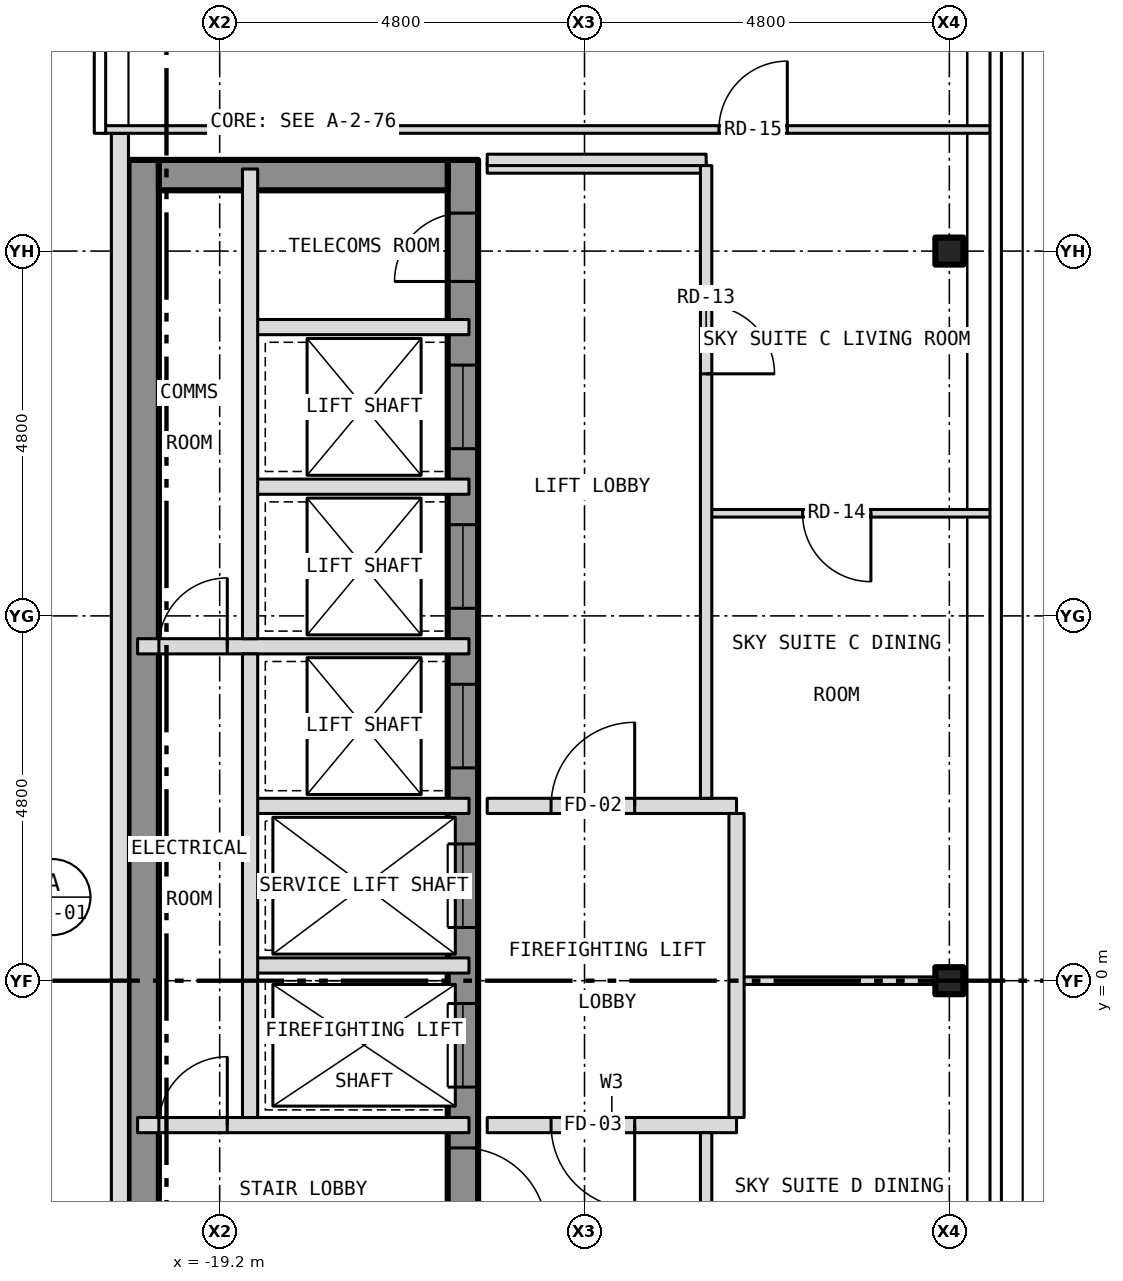
"""IFC4 building model, lengths in metres.
Left out: names, types, materials, properties, quantities, classifications, styles, units other than length and angle.
Written with IfcOpenShell. Run it as: python <this file> out.ifc"""

import sys

from ifc_helpers import new_model, si_unit, direction, frame, frame_2d, origin, origin_2d, place, context, subcontext, project, spatial, rectangle, i_section, extrude, element, fill, save


model = new_model("IFC4")
c1 = context("Model", 3, precision=1e-05, world=origin(), true_north=direction((0.0, 1.0)))
c2 = subcontext(c1, "Body", "Model", "MODEL_VIEW")
j1 = project(units=[si_unit("LENGTHUNIT", "METRE"), si_unit("PLANEANGLEUNIT", "RADIAN")], contexts=[c1])
p1 = place(None, origin())
s1 = spatial("IfcSite", under=j1, at=p1, CompositionType="ELEMENT")
p2 = place(p1, origin())
s2 = spatial("IfcBuilding", under=s1, at=p2, CompositionType="ELEMENT")
p3 = place(p2, frame((0.0, 0.0, 276.0)))
s3 = spatial("IfcBuildingStorey", under=s2, at=p3, CompositionType="ELEMENT", Elevation=276.0)
for number, where, z_axis, x_axis in (
    (1, (-9.6, 0.0, -0.15), (0.0, 0.0, 1.0), (1.0, 0.0, 0.0)),
    (2, (-9.6, 9.6, -0.15), (0.0, 0.0, 1.0), (1.0, 0.0, 0.0)),
):
    element("IfcColumn", number, at=place(p3, frame(where, z_axis=z_axis, x_axis=x_axis)), inside=s3, PredefinedType="COLUMN", context=c2, shape_type="SweptSolid", body=[
        extrude(i_section(OverallWidth=0.368, OverallDepth=0.356, WebThickness=0.011, FlangeThickness=0.018, at=origin_2d()), origin(), (0.0, 0.0, 1.0), 3.5),
    ])
p4 = place(p3, frame((-16.0, -10.8, 0.0), z_axis=(0.0, 0.0, 1.0), x_axis=(0.0, 1.0, 0.0)))
e3 = element("IfcWall", 3, at=p4, inside=s3, PredefinedType="SHEAR", context=c2, shape_type="SweptSolid", body=[
    extrude(rectangle(XDim=21.6, YDim=0.4, at=frame_2d((10.8, 0.0))), origin(), (0.0, 0.0, 1.0), 3.25),
])
p5 = place(p4, frame((9.4, 0.0, 0.0)))
e4 = element("IfcOpeningElement", 4, at=p5, cuts=e3, PredefinedType="OPENING", context=c2, shape_type="SweptSolid", body=[
    extrude(rectangle(XDim=1.1, YDim=2.1, at=frame_2d((0.55, 1.05))), frame((0.0, 0.212, 0.0), z_axis=(0.0, -1.0, 0.0), x_axis=(1.0, 0.0, 0.0)), (0.0, 0.0, 1.0), 0.424),
])
p6 = place(p4, frame((11.5, 0.0, 0.0)))
e5 = element("IfcOpeningElement", 5, at=p6, cuts=e3, PredefinedType="OPENING", context=c2, shape_type="SweptSolid", body=[
    extrude(rectangle(XDim=1.1, YDim=2.1, at=frame_2d((0.55, 1.05))), frame((0.0, 0.212, 0.0), z_axis=(0.0, -1.0, 0.0), x_axis=(1.0, 0.0, 0.0)), (0.0, 0.0, 1.0), 0.424),
])
p7 = place(p4, frame((13.6, 0.0, 0.0)))
e6 = element("IfcOpeningElement", 6, at=p7, cuts=e3, PredefinedType="OPENING", context=c2, shape_type="SweptSolid", body=[
    extrude(rectangle(XDim=1.1, YDim=2.1, at=frame_2d((0.55, 1.05))), frame((0.0, 0.212, 0.0), z_axis=(0.0, -1.0, 0.0), x_axis=(1.0, 0.0, 0.0)), (0.0, 0.0, 1.0), 0.424),
])
p8 = place(p4, frame((15.7, 0.0, 0.0)))
e7 = element("IfcOpeningElement", 7, at=p8, cuts=e3, PredefinedType="OPENING", context=c2, shape_type="SweptSolid", body=[
    extrude(rectangle(XDim=1.1, YDim=2.1, at=frame_2d((0.55, 1.05))), frame((0.0, 0.212, 0.0), z_axis=(0.0, -1.0, 0.0), x_axis=(1.0, 0.0, 0.0)), (0.0, 0.0, 1.0), 0.424),
])
p9 = place(p4, frame((17.8, 0.0, 0.0)))
e8 = element("IfcOpeningElement", 8, at=p9, cuts=e3, PredefinedType="OPENING", context=c2, shape_type="SweptSolid", body=[
    extrude(rectangle(XDim=1.1, YDim=2.1, at=frame_2d((0.55, 1.05))), frame((0.0, 0.212, 0.0), z_axis=(0.0, -1.0, 0.0), x_axis=(1.0, 0.0, 0.0)), (0.0, 0.0, 1.0), 0.424),
])
p10 = place(p4, frame((0.458, 0.0, 0.0)))
e9 = element("IfcOpeningElement", 9, at=p10, cuts=e3, PredefinedType="OPENING", context=c2, shape_type="SweptSolid", body=[
    extrude(rectangle(XDim=1.1, YDim=2.1, at=frame_2d((0.55, 1.05))), frame((0.0, 0.212, 0.0), z_axis=(0.0, -1.0, 0.0), x_axis=(1.0, 0.0, 0.0)), (0.0, 0.0, 1.0), 0.424),
])
p11 = place(p4, frame((7.5, 0.0, 0.0)))
e10 = element("IfcOpeningElement", 10, at=p11, cuts=e3, PredefinedType="OPENING", context=c2, shape_type="SweptSolid", body=[
    extrude(rectangle(XDim=1.1, YDim=2.1, at=frame_2d((0.55, 1.05))), frame((0.0, 0.212, 0.0), z_axis=(0.0, -1.0, 0.0), x_axis=(1.0, 0.0, 0.0)), (0.0, 0.0, 1.0), 0.424),
])
p12 = place(p4, frame((20.0, 0.0, 0.0)))
e11 = element("IfcOpeningElement", 11, at=p12, cuts=e3, PredefinedType="OPENING", context=c2, shape_type="SweptSolid", body=[
    extrude(rectangle(XDim=0.9, YDim=2.1, at=frame_2d((0.45, 1.05))), frame((0.0, 0.212, 0.0), z_axis=(0.0, -1.0, 0.0), x_axis=(1.0, 0.0, 0.0)), (0.0, 0.0, 1.0), 0.424),
])
p13 = place(p3, frame((-20.2, -10.8, 0.0), z_axis=(0.0, 0.0, 1.0), x_axis=(0.0, 1.0, 0.0)))
e12 = element("IfcWall", 12, at=p13, inside=s3, PredefinedType="SHEAR", context=c2, shape_type="SweptSolid", body=[
    extrude(rectangle(XDim=21.6, YDim=0.4, at=frame_2d((10.8, 0.0))), origin(), (0.0, 0.0, 1.0), 3.25),
])
p14 = place(p3, frame((-20.0, 10.6, 0.0), z_axis=(0.0, 0.0, 1.0), x_axis=(1.0, 0.0, 0.0)))
e13 = element("IfcWall", 13, at=p14, inside=s3, PredefinedType="SHEAR", context=c2, shape_type="SweptSolid", body=[
    extrude(rectangle(XDim=3.8, YDim=0.4, at=frame_2d((1.9, 0.0))), origin(), (0.0, 0.0, 1.0), 3.25),
])
p15 = place(p3, frame((-20.512, 11.15, 0.0), z_axis=(0.0, 0.0, 1.0), x_axis=(0.0, -1.0, 0.0)))
e14 = element("IfcWall", 14, at=p15, inside=s3, PredefinedType="SOLIDWALL", context=c2, shape_type="SweptSolid", body=[
    extrude(rectangle(XDim=22.3, YDim=0.225, at=frame_2d((11.15, 0.0))), origin(), (0.0, 0.0, 1.0), 3.5),
])
p16 = place(p15, frame((18.4, 0.0, 1.0)))
e15 = element("IfcOpeningElement", 15, at=p16, cuts=e14, PredefinedType="OPENING", context=c2, shape_type="SweptSolid", body=[
    extrude(rectangle(XDim=0.6, YDim=1.5, at=frame_2d((0.3, 0.75))), frame((0.0, 0.125, 0.0), z_axis=(0.0, -1.0, 0.0), x_axis=(1.0, 0.0, 0.0)), (0.0, 0.0, 1.0), 0.249),
])
p17 = place(p3, frame((-20.28, -1.9, 0.0), z_axis=(0.0, 0.0, 1.0), x_axis=(1.0, 0.0, 0.0)))
e16 = element("IfcWall", 16, at=p17, inside=s3, PredefinedType="PARTITIONING", context=c2, shape_type="SweptSolid", body=[
    extrude(rectangle(XDim=4.36, YDim=0.2, at=frame_2d((2.18, 0.0))), origin(), (0.0, 0.0, 1.0), 3.25),
])
p18 = place(p17, frame((0.28, 0.0, 0.0)))
e17 = element("IfcOpeningElement", 17, at=p18, cuts=e16, PredefinedType="OPENING", context=c2, shape_type="SweptSolid", body=[
    extrude(rectangle(XDim=0.9, YDim=2.1, at=frame_2d((0.45, 1.05))), frame((0.0, 0.112, 0.0), z_axis=(0.0, -1.0, 0.0), x_axis=(1.0, 0.0, 0.0)), (0.0, 0.0, 1.0), 0.224),
])
p19 = place(p3, frame((-15.68, -1.9, 0.0), z_axis=(0.0, 0.0, 1.0), x_axis=(1.0, 0.0, 0.0)))
e18 = element("IfcWall", 18, at=p19, inside=s3, PredefinedType="PARTITIONING", context=c2, shape_type="SweptSolid", body=[
    extrude(rectangle(XDim=3.28, YDim=0.2, at=frame_2d((1.64, 0.0))), origin(), (0.0, 0.0, 1.0), 3.35),
])
p20 = place(p19, frame((0.84, 0.0, 0.0)))
e19 = element("IfcOpeningElement", 19, at=p20, cuts=e18, PredefinedType="OPENING", context=c2, shape_type="SweptSolid", body=[
    extrude(rectangle(XDim=1.1, YDim=2.1, at=frame_2d((0.55, 1.05))), frame((0.0, 0.112, 0.0), z_axis=(0.0, -1.0, 0.0), x_axis=(1.0, 0.0, 0.0)), (0.0, 0.0, 1.0), 0.224),
])
p21 = place(p3, frame((-12.4, 0.0, 0.0), z_axis=(0.0, 0.0, 1.0), x_axis=(1.0, 0.0, 0.0)))
e20 = element("IfcWall", 20, at=p21, inside=s3, PredefinedType="PARTITIONING", context=c2, shape_type="SweptSolid", body=[
    extrude(rectangle(XDim=2.915, YDim=0.1, at=frame_2d((1.458, 0.0))), origin(), (0.0, 0.0, 1.0), 2.728),
])
for number, where, z_axis, x_axis in (
    (21, (-18.8, 0.2, 0.0), (0.0, 0.0, 1.0), (1.0, 0.0, 0.0)),
    (22, (-18.8, 2.3, 0.0), (0.0, 0.0, 1.0), (1.0, 0.0, 0.0)),
):
    element("IfcWall", number, at=place(p3, frame(where, z_axis=z_axis, x_axis=x_axis)), inside=s3, PredefinedType="PARTITIONING", context=c2, shape_type="SweptSolid", body=[
        extrude(rectangle(XDim=2.88, YDim=0.2, at=frame_2d((1.44, 0.0))), origin(), (0.0, 0.0, 1.0), 3.25),
    ])
p22 = place(p3, frame((-15.68, 2.3, 0.0), z_axis=(0.0, 0.0, 1.0), x_axis=(1.0, 0.0, 0.0)))
e23 = element("IfcWall", 23, at=p22, inside=s3, PredefinedType="PARTITIONING", context=c2, shape_type="SweptSolid", body=[
    extrude(rectangle(XDim=3.28, YDim=0.2, at=frame_2d((1.64, 0.0))), origin(), (0.0, 0.0, 1.0), 3.35),
])
p23 = place(p22, frame((0.84, 0.0, 0.0)))
e24 = element("IfcOpeningElement", 24, at=p23, cuts=e23, PredefinedType="OPENING", context=c2, shape_type="SweptSolid", body=[
    extrude(rectangle(XDim=1.1, YDim=2.1, at=frame_2d((0.55, 1.05))), frame((0.0, 0.112, 0.0), z_axis=(0.0, -1.0, 0.0), x_axis=(1.0, 0.0, 0.0)), (0.0, 0.0, 1.0), 0.224),
])
p24 = place(p3, frame((-20.28, 4.4, 0.0), z_axis=(0.0, 0.0, 1.0), x_axis=(1.0, 0.0, 0.0)))
e25 = element("IfcWall", 25, at=p24, inside=s3, PredefinedType="PARTITIONING", context=c2, shape_type="SweptSolid", body=[
    extrude(rectangle(XDim=4.36, YDim=0.2, at=frame_2d((2.18, 0.0))), origin(), (0.0, 0.0, 1.0), 3.25),
])
p25 = place(p24, frame((0.28, 0.0, 0.0)))
e26 = element("IfcOpeningElement", 26, at=p25, cuts=e25, PredefinedType="OPENING", context=c2, shape_type="SweptSolid", body=[
    extrude(rectangle(XDim=0.9, YDim=2.1, at=frame_2d((0.45, 1.05))), frame((0.0, 0.112, 0.0), z_axis=(0.0, -1.0, 0.0), x_axis=(1.0, 0.0, 0.0)), (0.0, 0.0, 1.0), 0.224),
])
p26 = place(p3, frame((-12.8, 6.15, 0.0), z_axis=(0.0, 0.0, 1.0), x_axis=(1.0, 0.0, 0.0)))
e27 = element("IfcWall", 27, at=p26, inside=s3, PredefinedType="PARTITIONING", context=c2, shape_type="SweptSolid", body=[
    extrude(rectangle(XDim=3.765, YDim=0.1, at=frame_2d((1.883, 0.0))), origin(), (0.0, 0.0, 1.0), 3.35),
])
p27 = place(p26, frame((1.268, 0.0, 0.0)))
e28 = element("IfcOpeningElement", 28, at=p27, cuts=e27, PredefinedType="OPENING", context=c2, shape_type="SweptSolid", body=[
    extrude(rectangle(XDim=0.9, YDim=2.1, at=frame_2d((0.45, 1.05))), frame((0.0, 0.062, 0.0), z_axis=(0.0, -1.0, 0.0), x_axis=(1.0, 0.0, 0.0)), (0.0, 0.0, 1.0), 0.124),
])
for number, where, z_axis, x_axis in (
    (29, (-18.8, 6.5, 0.0), (0.0, 0.0, 1.0), (1.0, 0.0, 0.0)),
    (30, (-18.8, 8.6, 0.0), (0.0, 0.0, 1.0), (1.0, 0.0, 0.0)),
):
    element("IfcWall", number, at=place(p3, frame(where, z_axis=z_axis, x_axis=x_axis)), inside=s3, PredefinedType="PARTITIONING", context=c2, shape_type="SweptSolid", body=[
        extrude(rectangle(XDim=2.88, YDim=0.2, at=frame_2d((1.44, 0.0))), origin(), (0.0, 0.0, 1.0), 3.25),
    ])
for number, where, z_axis, x_axis in (
    (31, (-15.68, 10.7, 0.0), (0.0, 0.0, 1.0), (1.0, 0.0, 0.0)),
    (32, (-15.68, 10.8, 0.0), (0.0, 0.0, 1.0), (1.0, 0.0, 0.0)),
):
    element("IfcWall", number, at=place(p3, frame(where, z_axis=z_axis, x_axis=x_axis)), inside=s3, PredefinedType="PARTITIONING", context=c2, shape_type="SweptSolid", body=[
        extrude(rectangle(XDim=2.88, YDim=0.15, at=frame_2d((1.44, 0.0))), origin(), (0.0, 0.0, 1.0), 3.35),
    ])
p28 = place(p3, frame((-20.73, 11.2, 0.0), z_axis=(0.0, 0.0, 1.0), x_axis=(1.0, 0.0, 0.0)))
e33 = element("IfcWall", 33, at=p28, inside=s3, PredefinedType="PARTITIONING", context=c2, shape_type="SweptSolid", body=[
    extrude(rectangle(XDim=11.695, YDim=0.1, at=frame_2d((5.848, 0.0))), origin(), (0.0, 0.0, 1.0), 3.35),
])
p29 = place(p28, frame((8.098, 0.0, 0.0)))
e34 = element("IfcOpeningElement", 34, at=p29, cuts=e33, PredefinedType="OPENING", context=c2, shape_type="SweptSolid", body=[
    extrude(rectangle(XDim=0.9, YDim=2.1, at=frame_2d((0.45, 1.05))), frame((0.0, 0.062, 0.0), z_axis=(0.0, -1.0, 0.0), x_axis=(1.0, 0.0, 0.0)), (0.0, 0.0, 1.0), 0.124),
])
p30 = place(p3, frame((-18.8, -1.8, 0.0), z_axis=(0.0, 0.0, 1.0), x_axis=(0.0, 1.0, 0.0)))
e35 = element("IfcWall", 35, at=p30, inside=s3, PredefinedType="PARTITIONING", context=c2, shape_type="SweptSolid", body=[
    extrude(rectangle(XDim=6.1, YDim=0.2, at=frame_2d((3.05, 0.0))), origin(), (0.0, 0.0, 1.0), 3.25),
])
p31 = place(p3, frame((-18.8, 4.5, 0.0), z_axis=(0.0, 0.0, 1.0), x_axis=(0.0, 1.0, 0.0)))
e36 = element("IfcWall", 36, at=p31, inside=s3, PredefinedType="PARTITIONING", context=c2, shape_type="SweptSolid", body=[
    extrude(rectangle(XDim=6.18, YDim=0.2, at=frame_2d((3.09, 0.0))), origin(), (0.0, 0.0, 1.0), 3.25),
])
p32 = place(p3, frame((-12.8, -10.725, 0.0), z_axis=(0.0, 0.0, 1.0), x_axis=(0.0, 1.0, 0.0)))
e37 = element("IfcWall", 37, at=p32, inside=s3, PredefinedType="PARTITIONING", context=c2, shape_type="SweptSolid", body=[
    extrude(rectangle(XDim=8.725, YDim=0.15, at=frame_2d((4.363, 0.0))), origin(), (0.0, 0.0, 1.0), 3.35),
])
p33 = place(p32, frame((2.88, 0.0, 0.0)))
e38 = element("IfcOpeningElement", 38, at=p33, cuts=e37, PredefinedType="OPENING", context=c2, shape_type="SweptSolid", body=[
    extrude(rectangle(XDim=0.9, YDim=2.1, at=frame_2d((0.45, 1.05))), frame((0.0, 0.087, 0.0), z_axis=(0.0, -1.0, 0.0), x_axis=(1.0, 0.0, 0.0)), (0.0, 0.0, 1.0), 0.174),
])
p34 = place(p3, frame((-12.8, 2.4, 0.0), z_axis=(0.0, 0.0, 1.0), x_axis=(0.0, 1.0, 0.0)))
e39 = element("IfcWall", 39, at=p34, inside=s3, PredefinedType="PARTITIONING", context=c2, shape_type="SweptSolid", body=[
    extrude(rectangle(XDim=8.325, YDim=0.15, at=frame_2d((4.163, 0.0))), origin(), (0.0, 0.0, 1.0), 3.35),
])
p35 = place(p34, frame((5.585, 0.0, 0.0)))
e40 = element("IfcOpeningElement", 40, at=p35, cuts=e39, PredefinedType="OPENING", context=c2, shape_type="SweptSolid", body=[
    extrude(rectangle(XDim=0.9, YDim=2.1, at=frame_2d((0.45, 1.05))), frame((0.0, 0.087, 0.0), z_axis=(0.0, -1.0, 0.0), x_axis=(1.0, 0.0, 0.0)), (0.0, 0.0, 1.0), 0.174),
])
p36 = place(p3, frame((-12.4, -1.8, 0.0), z_axis=(0.0, 0.0, 1.0), x_axis=(0.0, 1.0, 0.0)))
e41 = element("IfcWall", 41, at=p36, inside=s3, PredefinedType="PARTITIONING", context=c2, shape_type="SweptSolid", body=[
    extrude(rectangle(XDim=4.0, YDim=0.2, at=frame_2d((2.0, 0.0))), origin(), (0.0, 0.0, 1.0), 3.35),
])
p37 = place(p5, origin())
e42 = element("IfcDoor", 42, at=p37, inside=s3, OperationType="SLIDING_TO_LEFT", PredefinedType="DOOR", context=c2, shape_type="SweptSolid", body=[
    extrude(rectangle(XDim=1.1, YDim=2.1, at=frame_2d((0.55, 1.05))), frame((0.0, 0.025, 0.0), z_axis=(0.0, -1.0, 0.0), x_axis=(1.0, 0.0, 0.0)), (0.0, 0.0, 1.0), 0.05),
])
fill(e4, e42)
p38 = place(p6, origin())
e43 = element("IfcDoor", 43, at=p38, inside=s3, OperationType="SLIDING_TO_LEFT", PredefinedType="DOOR", context=c2, shape_type="SweptSolid", body=[
    extrude(rectangle(XDim=1.1, YDim=2.1, at=frame_2d((0.55, 1.05))), frame((0.0, 0.025, 0.0), z_axis=(0.0, -1.0, 0.0), x_axis=(1.0, 0.0, 0.0)), (0.0, 0.0, 1.0), 0.05),
])
fill(e5, e43)
p39 = place(p7, origin())
e44 = element("IfcDoor", 44, at=p39, inside=s3, OperationType="SLIDING_TO_LEFT", PredefinedType="DOOR", context=c2, shape_type="SweptSolid", body=[
    extrude(rectangle(XDim=1.1, YDim=2.1, at=frame_2d((0.55, 1.05))), frame((0.0, 0.025, 0.0), z_axis=(0.0, -1.0, 0.0), x_axis=(1.0, 0.0, 0.0)), (0.0, 0.0, 1.0), 0.05),
])
fill(e6, e44)
p40 = place(p8, origin())
e45 = element("IfcDoor", 45, at=p40, inside=s3, OperationType="SLIDING_TO_LEFT", PredefinedType="DOOR", context=c2, shape_type="SweptSolid", body=[
    extrude(rectangle(XDim=1.1, YDim=2.1, at=frame_2d((0.55, 1.05))), frame((0.0, 0.025, 0.0), z_axis=(0.0, -1.0, 0.0), x_axis=(1.0, 0.0, 0.0)), (0.0, 0.0, 1.0), 0.05),
])
fill(e7, e45)
p41 = place(p9, origin())
e46 = element("IfcDoor", 46, at=p41, inside=s3, OperationType="SLIDING_TO_LEFT", PredefinedType="DOOR", context=c2, shape_type="SweptSolid", body=[
    extrude(rectangle(XDim=1.1, YDim=2.1, at=frame_2d((0.55, 1.05))), frame((0.0, 0.025, 0.0), z_axis=(0.0, -1.0, 0.0), x_axis=(1.0, 0.0, 0.0)), (0.0, 0.0, 1.0), 0.05),
])
fill(e8, e46)
p42 = place(p11, origin())
e47 = element("IfcDoor", 47, at=p42, inside=s3, OperationType="SINGLE_SWING_LEFT", PredefinedType="DOOR", context=c2, shape_type="SweptSolid", body=[
    extrude(rectangle(XDim=1.1, YDim=2.1, at=frame_2d((0.55, 1.05))), frame((0.0, 0.025, 0.0), z_axis=(0.0, -1.0, 0.0), x_axis=(1.0, 0.0, 0.0)), (0.0, 0.0, 1.0), 0.05),
])
fill(e10, e47)
p43 = place(p12, origin())
e48 = element("IfcDoor", 48, at=p43, inside=s3, OperationType="SINGLE_SWING_LEFT", PredefinedType="DOOR", context=c2, shape_type="SweptSolid", body=[
    extrude(rectangle(XDim=0.9, YDim=2.1, at=frame_2d((0.45, 1.05))), frame((0.0, 0.025, 0.0), z_axis=(0.0, -1.0, 0.0), x_axis=(1.0, 0.0, 0.0)), (0.0, 0.0, 1.0), 0.05),
])
fill(e11, e48)
p44 = place(p18, origin())
e49 = element("IfcDoor", 49, at=p44, inside=s3, OperationType="SINGLE_SWING_RIGHT", PredefinedType="DOOR", context=c2, shape_type="SweptSolid", body=[
    extrude(rectangle(XDim=0.9, YDim=2.1, at=frame_2d((0.45, 1.05))), frame((0.0, 0.025, 0.0), z_axis=(0.0, -1.0, 0.0), x_axis=(1.0, 0.0, 0.0)), (0.0, 0.0, 1.0), 0.05),
])
fill(e17, e49)
p45 = place(p25, origin())
e50 = element("IfcDoor", 50, at=p45, inside=s3, OperationType="SINGLE_SWING_RIGHT", PredefinedType="DOOR", context=c2, shape_type="SweptSolid", body=[
    extrude(rectangle(XDim=0.9, YDim=2.1, at=frame_2d((0.45, 1.05))), frame((0.0, 0.025, 0.0), z_axis=(0.0, -1.0, 0.0), x_axis=(1.0, 0.0, 0.0)), (0.0, 0.0, 1.0), 0.05),
])
fill(e26, e50)
p46 = place(p23, origin())
e51 = element("IfcDoor", 51, at=p46, inside=s3, OperationType="SINGLE_SWING_RIGHT", PredefinedType="DOOR", context=c2, shape_type="SweptSolid", body=[
    extrude(rectangle(XDim=1.1, YDim=2.1, at=frame_2d((0.55, 1.05))), frame((0.0, 0.025, 0.0), z_axis=(0.0, -1.0, 0.0), x_axis=(1.0, 0.0, 0.0)), (0.0, 0.0, 1.0), 0.05),
])
fill(e24, e51)
p47 = place(p20, origin())
e52 = element("IfcDoor", 52, at=p47, inside=s3, OperationType="SINGLE_SWING_RIGHT", PredefinedType="DOOR", context=c2, shape_type="SweptSolid", body=[
    extrude(rectangle(XDim=1.1, YDim=2.1, at=frame_2d((0.55, 1.05))), frame((0.0, 0.025, 0.0), z_axis=(0.0, -1.0, 0.0), x_axis=(1.0, 0.0, 0.0)), (0.0, 0.0, 1.0), 0.05),
])
fill(e19, e52)
p48 = place(p35, origin())
e53 = element("IfcDoor", 53, at=p48, inside=s3, OperationType="SINGLE_SWING_LEFT", PredefinedType="DOOR", context=c2, shape_type="SweptSolid", body=[
    extrude(rectangle(XDim=0.9, YDim=2.1, at=frame_2d((0.45, 1.05))), frame((0.0, 0.025, 0.0), z_axis=(0.0, -1.0, 0.0), x_axis=(1.0, 0.0, 0.0)), (0.0, 0.0, 1.0), 0.05),
])
fill(e40, e53)
p49 = place(p27, origin())
e54 = element("IfcDoor", 54, at=p49, inside=s3, OperationType="SINGLE_SWING_RIGHT", PredefinedType="DOOR", context=c2, shape_type="SweptSolid", body=[
    extrude(rectangle(XDim=0.9, YDim=2.1, at=frame_2d((0.45, 1.05))), frame((0.0, 0.025, 0.0), z_axis=(0.0, -1.0, 0.0), x_axis=(1.0, 0.0, 0.0)), (0.0, 0.0, 1.0), 0.05),
])
fill(e28, e54)
p50 = place(p29, origin())
e55 = element("IfcDoor", 55, at=p50, inside=s3, OperationType="SINGLE_SWING_RIGHT", PredefinedType="DOOR", context=c2, shape_type="SweptSolid", body=[
    extrude(rectangle(XDim=0.9, YDim=2.1, at=frame_2d((0.45, 1.05))), frame((0.0, 0.025, 0.0), z_axis=(0.0, -1.0, 0.0), x_axis=(1.0, 0.0, 0.0)), (0.0, 0.0, 1.0), 0.05),
])
fill(e34, e55)
save(model, sys.argv[1])
